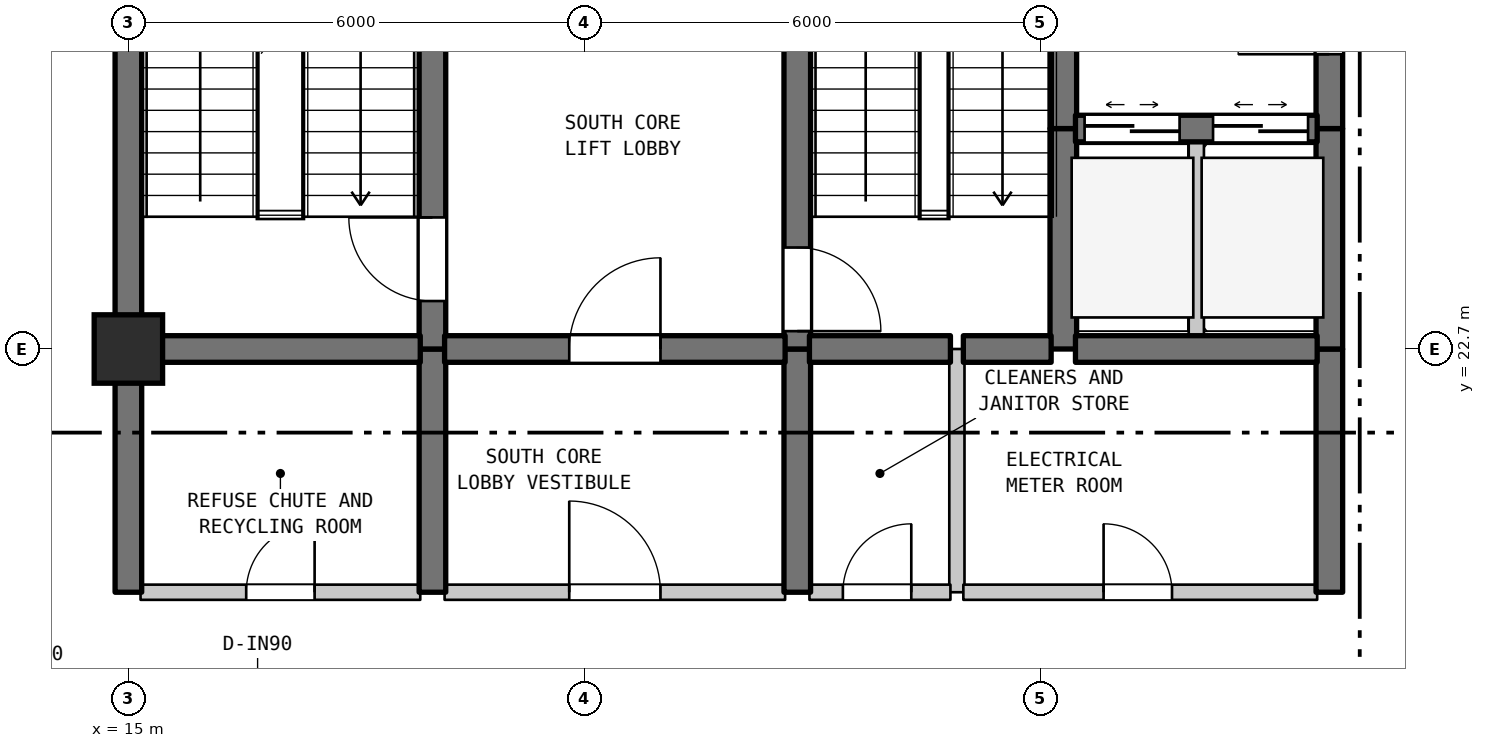
"""IFC4 building model, lengths in metres.
Left out: names, types, materials, properties, quantities, classifications, styles, units other than length and angle.
Written with IfcOpenShell. Run it as: python <this file> out.ifc"""

import sys

from ifc_helpers import new_model, si_unit, direction, frame, frame_2d, origin, origin_2d, place, context, subcontext, project, spatial, rectangle, extrude, element, fill, save


model = new_model("IFC4")
c1 = context("Model", 3, precision=1e-05, world=origin(), true_north=direction((0.0, 1.0)))
c2 = subcontext(c1, "Body", "Model", "MODEL_VIEW")
j1 = project(units=[si_unit("LENGTHUNIT", "METRE"), si_unit("PLANEANGLEUNIT", "RADIAN")], contexts=[c1])
p1 = place(None, origin())
s1 = spatial("IfcSite", under=j1, at=p1, CompositionType="ELEMENT")
p2 = place(p1, origin())
s2 = spatial("IfcBuilding", under=s1, at=p2, CompositionType="ELEMENT")
p3 = place(p2, frame((0.0, 0.0, 129.8)))
s3 = spatial("IfcBuildingStorey", under=s2, at=p3, CompositionType="ELEMENT", Elevation=129.8)
p4 = place(p3, frame((15.0, 22.7, 0.0), z_axis=(0.0, 0.0, 1.0), x_axis=(1.0, 0.0, 0.0)))
e1 = element("IfcColumn", 1, at=p4, inside=s3, PredefinedType="COLUMN", context=c2, shape_type="SweptSolid", body=[
    extrude(rectangle(XDim=0.9, YDim=0.9, at=origin_2d()), origin(), (0.0, 0.0, 1.0), 3.7),
])
p5 = place(p3, frame((15.0, 19.5, 0.0), z_axis=(0.0, 0.0, 1.0), x_axis=(0.0, 1.0, 0.0)))
e2 = element("IfcWall", 2, at=p5, inside=s3, PredefinedType="SHEAR", context=c2, shape_type="SweptSolid", body=[
    extrude(rectangle(XDim=3.2, YDim=0.35, at=frame_2d((1.6, 0.0))), origin(), (0.0, 0.0, 1.0), 3.385),
])
p6 = place(p3, frame((15.0, 22.7, 0.0), z_axis=(0.0, 0.0, 1.0), x_axis=(0.0, 1.0, 0.0)))
e3 = element("IfcWall", 3, at=p6, inside=s3, PredefinedType="SHEAR", context=c2, shape_type="SweptSolid", body=[
    extrude(rectangle(XDim=6.8, YDim=0.35, at=frame_2d((3.4, 0.0))), origin(), (0.0, 0.0, 1.0), 3.385),
])
p7 = place(p3, frame((19.0, 19.5, 0.0), z_axis=(0.0, 0.0, 1.0), x_axis=(0.0, 1.0, 0.0)))
e4 = element("IfcWall", 4, at=p7, inside=s3, PredefinedType="SHEAR", context=c2, shape_type="SweptSolid", body=[
    extrude(rectangle(XDim=3.2, YDim=0.35, at=frame_2d((1.6, 0.0))), origin(), (0.0, 0.0, 1.0), 3.385),
])
p8 = place(p3, frame((19.0, 22.7, 0.0), z_axis=(0.0, 0.0, 1.0), x_axis=(0.0, 1.0, 0.0)))
e5 = element("IfcWall", 5, at=p8, inside=s3, PredefinedType="SHEAR", context=c2, shape_type="SweptSolid", body=[
    extrude(rectangle(XDim=5.5, YDim=0.35, at=frame_2d((2.75, 0.0))), origin(), (0.0, 0.0, 1.0), 3.385),
])
p9 = place(p8, frame((0.631, 0.0, 0.0)))
e6 = element("IfcOpeningElement", 6, at=p9, cuts=e5, PredefinedType="OPENING", context=c2, shape_type="SweptSolid", body=[
    extrude(rectangle(XDim=1.1, YDim=2.15, at=frame_2d((0.55, 1.075))), frame((0.0, 0.185, 0.0), z_axis=(0.0, -1.0, 0.0), x_axis=(1.0, 0.0, 0.0)), (0.0, 0.0, 1.0), 0.37),
])
p10 = place(p3, frame((23.8, 19.5, 0.0), z_axis=(0.0, 0.0, 1.0), x_axis=(0.0, 1.0, 0.0)))
e7 = element("IfcWall", 7, at=p10, inside=s3, PredefinedType="SHEAR", context=c2, shape_type="SweptSolid", body=[
    extrude(rectangle(XDim=3.2, YDim=0.35, at=frame_2d((1.6, 0.0))), origin(), (0.0, 0.0, 1.0), 3.385),
])
p11 = place(p3, frame((23.8, 22.7, 0.0), z_axis=(0.0, 0.0, 1.0), x_axis=(0.0, 1.0, 0.0)))
e8 = element("IfcWall", 8, at=p11, inside=s3, PredefinedType="SHEAR", context=c2, shape_type="SweptSolid", body=[
    extrude(rectangle(XDim=5.5, YDim=0.35, at=frame_2d((2.75, 0.0))), origin(), (0.0, 0.0, 1.0), 3.385),
])
p12 = place(p11, frame((0.235, 0.0, 0.0)))
e9 = element("IfcOpeningElement", 9, at=p12, cuts=e8, PredefinedType="OPENING", context=c2, shape_type="SweptSolid", body=[
    extrude(rectangle(XDim=1.1, YDim=2.15, at=frame_2d((0.55, 1.075))), frame((0.0, 0.185, 0.0), z_axis=(0.0, -1.0, 0.0), x_axis=(1.0, 0.0, 0.0)), (0.0, 0.0, 1.0), 0.37),
])
p13 = place(p3, frame((25.9, 19.5, 0.0), z_axis=(0.0, 0.0, 1.0), x_axis=(0.0, 1.0, 0.0)))
e10 = element("IfcWall", 10, at=p13, inside=s3, PredefinedType="STANDARD", context=c2, shape_type="SweptSolid", body=[
    extrude(rectangle(XDim=3.2, YDim=0.2, at=frame_2d((1.6, 0.0))), origin(), (0.0, 0.0, 1.0), 3.385),
])
p14 = place(p3, frame((27.3, 22.7, 0.0), z_axis=(0.0, 0.0, 1.0), x_axis=(0.0, 1.0, 0.0)))
e11 = element("IfcWall", 11, at=p14, inside=s3, PredefinedType="SHEAR", context=c2, shape_type="SweptSolid", body=[
    extrude(rectangle(XDim=2.9, YDim=0.35, at=frame_2d((1.45, 0.0))), origin(), (0.0, 0.0, 1.0), 3.385),
])
p15 = place(p3, frame((27.3, 25.6, 0.0), z_axis=(0.0, 0.0, 1.0), x_axis=(0.0, 1.0, 0.0)))
e12 = element("IfcWall", 12, at=p15, inside=s3, PredefinedType="SHEAR", context=c2, shape_type="SweptSolid", body=[
    extrude(rectangle(XDim=3.3, YDim=0.35, at=frame_2d((1.65, 0.0))), origin(), (0.0, 0.0, 1.0), 3.385),
])
p16 = place(p3, frame((29.05, 22.7, 0.0), z_axis=(0.0, 0.0, 1.0), x_axis=(0.0, 1.0, 0.0)))
e13 = element("IfcWall", 13, at=p16, inside=s3, PredefinedType="STANDARD", context=c2, shape_type="SweptSolid", body=[
    extrude(rectangle(XDim=2.9, YDim=0.2, at=frame_2d((1.45, 0.0))), origin(), (0.0, 0.0, 1.0), 3.385),
])
p17 = place(p3, frame((30.8, 19.5, 0.0), z_axis=(0.0, 0.0, 1.0), x_axis=(0.0, 1.0, 0.0)))
e14 = element("IfcWall", 14, at=p17, inside=s3, PredefinedType="SHEAR", context=c2, shape_type="SweptSolid", body=[
    extrude(rectangle(XDim=3.2, YDim=0.35, at=frame_2d((1.6, 0.0))), origin(), (0.0, 0.0, 1.0), 3.385),
])
p18 = place(p3, frame((30.8, 22.7, 0.0), z_axis=(0.0, 0.0, 1.0), x_axis=(0.0, 1.0, 0.0)))
e15 = element("IfcWall", 15, at=p18, inside=s3, PredefinedType="SHEAR", context=c2, shape_type="SweptSolid", body=[
    extrude(rectangle(XDim=2.9, YDim=0.35, at=frame_2d((1.45, 0.0))), origin(), (0.0, 0.0, 1.0), 3.385),
])
p19 = place(p3, frame((30.8, 25.6, 0.0), z_axis=(0.0, 0.0, 1.0), x_axis=(0.0, 1.0, 0.0)))
e16 = element("IfcWall", 16, at=p19, inside=s3, PredefinedType="SHEAR", context=c2, shape_type="SweptSolid", body=[
    extrude(rectangle(XDim=3.3, YDim=0.35, at=frame_2d((1.65, 0.0))), origin(), (0.0, 0.0, 1.0), 3.385),
])
p20 = place(p19, frame((0.978, 0.0, 0.0)))
e17 = element("IfcOpeningElement", 17, at=p20, cuts=e16, PredefinedType="OPENING", context=c2, shape_type="SweptSolid", body=[
    extrude(rectangle(XDim=1.2, YDim=2.2, at=frame_2d((0.6, 1.1))), frame((0.0, 0.185, 0.0), z_axis=(0.0, -1.0, 0.0), x_axis=(1.0, 0.0, 0.0)), (0.0, 0.0, 1.0), 0.37),
])
p21 = place(p3, frame((15.16, 19.5, 0.0), z_axis=(0.0, 0.0, 1.0), x_axis=(1.0, 0.0, 0.0)))
e18 = element("IfcWall", 18, at=p21, inside=s3, PredefinedType="STANDARD", context=c2, shape_type="SweptSolid", body=[
    extrude(rectangle(XDim=3.68, YDim=0.2, at=frame_2d((1.84, 0.0))), origin(), (0.0, 0.0, 1.0), 3.385),
])
p22 = place(p21, frame((1.39, 0.0, 0.0)))
e19 = element("IfcOpeningElement", 19, at=p22, cuts=e18, PredefinedType="OPENING", context=c2, shape_type="SweptSolid", body=[
    extrude(rectangle(XDim=0.9, YDim=2.15, at=frame_2d((0.45, 1.075))), frame((0.0, 0.11, 0.0), z_axis=(0.0, -1.0, 0.0), x_axis=(1.0, 0.0, 0.0)), (0.0, 0.0, 1.0), 0.22),
])
p23 = place(p3, frame((19.16, 19.5, 0.0), z_axis=(0.0, 0.0, 1.0), x_axis=(1.0, 0.0, 0.0)))
e20 = element("IfcWall", 20, at=p23, inside=s3, PredefinedType="STANDARD", context=c2, shape_type="SweptSolid", body=[
    extrude(rectangle(XDim=4.48, YDim=0.2, at=frame_2d((2.24, 0.0))), origin(), (0.0, 0.0, 1.0), 3.385),
])
p24 = place(p23, frame((1.64, 0.0, 0.0)))
e21 = element("IfcOpeningElement", 21, at=p24, cuts=e20, PredefinedType="OPENING", context=c2, shape_type="SweptSolid", body=[
    extrude(rectangle(XDim=1.2, YDim=2.2, at=frame_2d((0.6, 1.1))), frame((0.0, 0.11, 0.0), z_axis=(0.0, -1.0, 0.0), x_axis=(1.0, 0.0, 0.0)), (0.0, 0.0, 1.0), 0.22),
])
p25 = place(p3, frame((23.96, 19.5, 0.0), z_axis=(0.0, 0.0, 1.0), x_axis=(1.0, 0.0, 0.0)))
e22 = element("IfcWall", 22, at=p25, inside=s3, PredefinedType="STANDARD", context=c2, shape_type="SweptSolid", body=[
    extrude(rectangle(XDim=1.855, YDim=0.2, at=frame_2d((0.927, 0.0))), origin(), (0.0, 0.0, 1.0), 3.385),
])
p26 = place(p25, frame((0.44, 0.0, 0.0)))
e23 = element("IfcOpeningElement", 23, at=p26, cuts=e22, PredefinedType="OPENING", context=c2, shape_type="SweptSolid", body=[
    extrude(rectangle(XDim=0.9, YDim=2.15, at=frame_2d((0.45, 1.075))), frame((0.0, 0.11, 0.0), z_axis=(0.0, -1.0, 0.0), x_axis=(1.0, 0.0, 0.0)), (0.0, 0.0, 1.0), 0.22),
])
p27 = place(p3, frame((25.985, 19.5, 0.0), z_axis=(0.0, 0.0, 1.0), x_axis=(1.0, 0.0, 0.0)))
e24 = element("IfcWall", 24, at=p27, inside=s3, PredefinedType="STANDARD", context=c2, shape_type="SweptSolid", body=[
    extrude(rectangle(XDim=4.655, YDim=0.2, at=frame_2d((2.327, 0.0))), origin(), (0.0, 0.0, 1.0), 3.385),
])
p28 = place(p27, frame((1.845, 0.0, 0.0)))
e25 = element("IfcOpeningElement", 25, at=p28, cuts=e24, PredefinedType="OPENING", context=c2, shape_type="SweptSolid", body=[
    extrude(rectangle(XDim=0.9, YDim=2.15, at=frame_2d((0.45, 1.075))), frame((0.0, 0.11, 0.0), z_axis=(0.0, -1.0, 0.0), x_axis=(1.0, 0.0, 0.0)), (0.0, 0.0, 1.0), 0.22),
])
p29 = place(p3, frame((15.16, 22.7, 0.0), z_axis=(0.0, 0.0, 1.0), x_axis=(1.0, 0.0, 0.0)))
e26 = element("IfcWall", 26, at=p29, inside=s3, PredefinedType="SHEAR", context=c2, shape_type="SweptSolid", body=[
    extrude(rectangle(XDim=3.68, YDim=0.35, at=frame_2d((1.84, 0.0))), origin(), (0.0, 0.0, 1.0), 3.385),
])
p30 = place(p3, frame((19.16, 22.7, 0.0), z_axis=(0.0, 0.0, 1.0), x_axis=(1.0, 0.0, 0.0)))
e27 = element("IfcWall", 27, at=p30, inside=s3, PredefinedType="SHEAR", context=c2, shape_type="SweptSolid", body=[
    extrude(rectangle(XDim=4.48, YDim=0.35, at=frame_2d((2.24, 0.0))), origin(), (0.0, 0.0, 1.0), 3.385),
])
p31 = place(p30, frame((1.64, 0.0, 0.0)))
e28 = element("IfcOpeningElement", 28, at=p31, cuts=e27, PredefinedType="OPENING", context=c2, shape_type="SweptSolid", body=[
    extrude(rectangle(XDim=1.2, YDim=2.2, at=frame_2d((0.6, 1.1))), frame((0.0, 0.185, 0.0), z_axis=(0.0, -1.0, 0.0), x_axis=(1.0, 0.0, 0.0)), (0.0, 0.0, 1.0), 0.37),
])
p32 = place(p3, frame((23.96, 22.7, 0.0), z_axis=(0.0, 0.0, 1.0), x_axis=(1.0, 0.0, 0.0)))
e29 = element("IfcWall", 29, at=p32, inside=s3, PredefinedType="SHEAR", context=c2, shape_type="SweptSolid", body=[
    extrude(rectangle(XDim=1.855, YDim=0.35, at=frame_2d((0.927, 0.0))), origin(), (0.0, 0.0, 1.0), 3.385),
])
p33 = place(p3, frame((25.985, 22.7, 0.0), z_axis=(0.0, 0.0, 1.0), x_axis=(1.0, 0.0, 0.0)))
e30 = element("IfcWall", 30, at=p33, inside=s3, PredefinedType="SHEAR", context=c2, shape_type="SweptSolid", body=[
    extrude(rectangle(XDim=1.155, YDim=0.35, at=frame_2d((0.577, 0.0))), origin(), (0.0, 0.0, 1.0), 3.385),
])
p34 = place(p3, frame((27.46, 22.7, 0.0), z_axis=(0.0, 0.0, 1.0), x_axis=(1.0, 0.0, 0.0)))
e31 = element("IfcWall", 31, at=p34, inside=s3, PredefinedType="SHEAR", context=c2, shape_type="SweptSolid", body=[
    extrude(rectangle(XDim=3.18, YDim=0.35, at=frame_2d((1.59, 0.0))), origin(), (0.0, 0.0, 1.0), 3.385),
])
p35 = place(p3, frame((27.46, 25.6, 0.0), z_axis=(0.0, 0.0, 1.0), x_axis=(1.0, 0.0, 0.0)))
e32 = element("IfcWall", 32, at=p35, inside=s3, PredefinedType="SHEAR", context=c2, shape_type="SweptSolid", body=[
    extrude(rectangle(XDim=3.18, YDim=0.35, at=frame_2d((1.59, 0.0))), origin(), (0.0, 0.0, 1.0), 3.385),
])
p36 = place(p35, frame((0.12, 0.0, 0.0)))
e33 = element("IfcOpeningElement", 33, at=p36, cuts=e32, PredefinedType="OPENING", context=c2, shape_type="SweptSolid", body=[
    extrude(rectangle(XDim=1.25, YDim=2.2, at=frame_2d((0.625, 1.1))), frame((0.0, 0.185, 0.0), z_axis=(0.0, -1.0, 0.0), x_axis=(1.0, 0.0, 0.0)), (0.0, 0.0, 1.0), 0.37),
])
p37 = place(p35, frame((1.81, 0.0, 0.0)))
e34 = element("IfcOpeningElement", 34, at=p37, cuts=e32, PredefinedType="OPENING", context=c2, shape_type="SweptSolid", body=[
    extrude(rectangle(XDim=1.25, YDim=2.2, at=frame_2d((0.625, 1.1))), frame((0.0, 0.185, 0.0), z_axis=(0.0, -1.0, 0.0), x_axis=(1.0, 0.0, 0.0)), (0.0, 0.0, 1.0), 0.37),
])
p38 = place(p9, origin())
e35 = element("IfcDoor", 35, at=p38, inside=s3, OperationType="SINGLE_SWING_RIGHT", PredefinedType="DOOR", context=c2, shape_type="SweptSolid", body=[
    extrude(rectangle(XDim=1.1, YDim=2.15, at=frame_2d((0.55, 1.075))), frame((0.0, 0.025, 0.0), z_axis=(0.0, -1.0, 0.0), x_axis=(1.0, 0.0, 0.0)), (0.0, 0.0, 1.0), 0.05),
])
fill(e6, e35)
p39 = place(p12, frame((1.1, 0.0, 0.0), z_axis=(0.0, 0.0, 1.0), x_axis=(-1.0, 0.0, 0.0)))
e36 = element("IfcDoor", 36, at=p39, inside=s3, OperationType="SINGLE_SWING_LEFT", PredefinedType="DOOR", context=c2, shape_type="SweptSolid", body=[
    extrude(rectangle(XDim=1.1, YDim=2.15, at=frame_2d((0.55, 1.075))), frame((0.0, 0.025, 0.0), z_axis=(0.0, -1.0, 0.0), x_axis=(1.0, 0.0, 0.0)), (0.0, 0.0, 1.0), 0.05),
])
fill(e9, e36)
p40 = place(p20, origin())
e37 = element("IfcDoor", 37, at=p40, inside=s3, OperationType="SINGLE_SWING_LEFT", PredefinedType="DOOR", context=c2, shape_type="SweptSolid", body=[
    extrude(rectangle(XDim=1.2, YDim=2.2, at=frame_2d((0.6, 1.1))), frame((0.0, 0.025, 0.0), z_axis=(0.0, -1.0, 0.0), x_axis=(1.0, 0.0, 0.0)), (0.0, 0.0, 1.0), 0.05),
])
fill(e17, e37)
p41 = place(p22, origin())
e38 = element("IfcDoor", 38, at=p41, inside=s3, OperationType="SINGLE_SWING_RIGHT", PredefinedType="DOOR", context=c2, shape_type="SweptSolid", body=[
    extrude(rectangle(XDim=0.9, YDim=2.15, at=frame_2d((0.45, 1.075))), frame((0.0, 0.025, 0.0), z_axis=(0.0, -1.0, 0.0), x_axis=(1.0, 0.0, 0.0)), (0.0, 0.0, 1.0), 0.05),
])
fill(e19, e38)
p42 = place(p24, origin())
e39 = element("IfcDoor", 39, at=p42, inside=s3, OperationType="SINGLE_SWING_LEFT", PredefinedType="DOOR", context=c2, shape_type="SweptSolid", body=[
    extrude(rectangle(XDim=1.2, YDim=2.2, at=frame_2d((0.6, 1.1))), frame((0.0, 0.025, 0.0), z_axis=(0.0, -1.0, 0.0), x_axis=(1.0, 0.0, 0.0)), (0.0, 0.0, 1.0), 0.05),
])
fill(e21, e39)
p43 = place(p26, origin())
e40 = element("IfcDoor", 40, at=p43, inside=s3, OperationType="SINGLE_SWING_RIGHT", PredefinedType="DOOR", context=c2, shape_type="SweptSolid", body=[
    extrude(rectangle(XDim=0.9, YDim=2.15, at=frame_2d((0.45, 1.075))), frame((0.0, 0.025, 0.0), z_axis=(0.0, -1.0, 0.0), x_axis=(1.0, 0.0, 0.0)), (0.0, 0.0, 1.0), 0.05),
])
fill(e23, e40)
p44 = place(p28, origin())
e41 = element("IfcDoor", 41, at=p44, inside=s3, OperationType="SINGLE_SWING_LEFT", PredefinedType="DOOR", context=c2, shape_type="SweptSolid", body=[
    extrude(rectangle(XDim=0.9, YDim=2.15, at=frame_2d((0.45, 1.075))), frame((0.0, 0.025, 0.0), z_axis=(0.0, -1.0, 0.0), x_axis=(1.0, 0.0, 0.0)), (0.0, 0.0, 1.0), 0.05),
])
fill(e25, e41)
p45 = place(p31, origin())
e42 = element("IfcDoor", 42, at=p45, inside=s3, OperationType="SINGLE_SWING_RIGHT", PredefinedType="DOOR", context=c2, shape_type="SweptSolid", body=[
    extrude(rectangle(XDim=1.2, YDim=2.2, at=frame_2d((0.6, 1.1))), frame((0.0, 0.025, 0.0), z_axis=(0.0, -1.0, 0.0), x_axis=(1.0, 0.0, 0.0)), (0.0, 0.0, 1.0), 0.05),
])
fill(e28, e42)
p46 = place(p36, origin())
e43 = element("IfcDoor", 43, at=p46, inside=s3, OperationType="DOUBLE_DOOR_SLIDING", PredefinedType="DOOR", context=c2, shape_type="SweptSolid", body=[
    extrude(rectangle(XDim=1.25, YDim=2.2, at=frame_2d((0.625, 1.1))), frame((0.0, 0.025, 0.0), z_axis=(0.0, -1.0, 0.0), x_axis=(1.0, 0.0, 0.0)), (0.0, 0.0, 1.0), 0.05),
])
fill(e33, e43)
p47 = place(p37, origin())
e44 = element("IfcDoor", 44, at=p47, inside=s3, OperationType="DOUBLE_DOOR_SLIDING", PredefinedType="DOOR", context=c2, shape_type="SweptSolid", body=[
    extrude(rectangle(XDim=1.25, YDim=2.2, at=frame_2d((0.625, 1.1))), frame((0.0, 0.025, 0.0), z_axis=(0.0, -1.0, 0.0), x_axis=(1.0, 0.0, 0.0)), (0.0, 0.0, 1.0), 0.05),
])
fill(e34, e44)
save(model, sys.argv[1])
